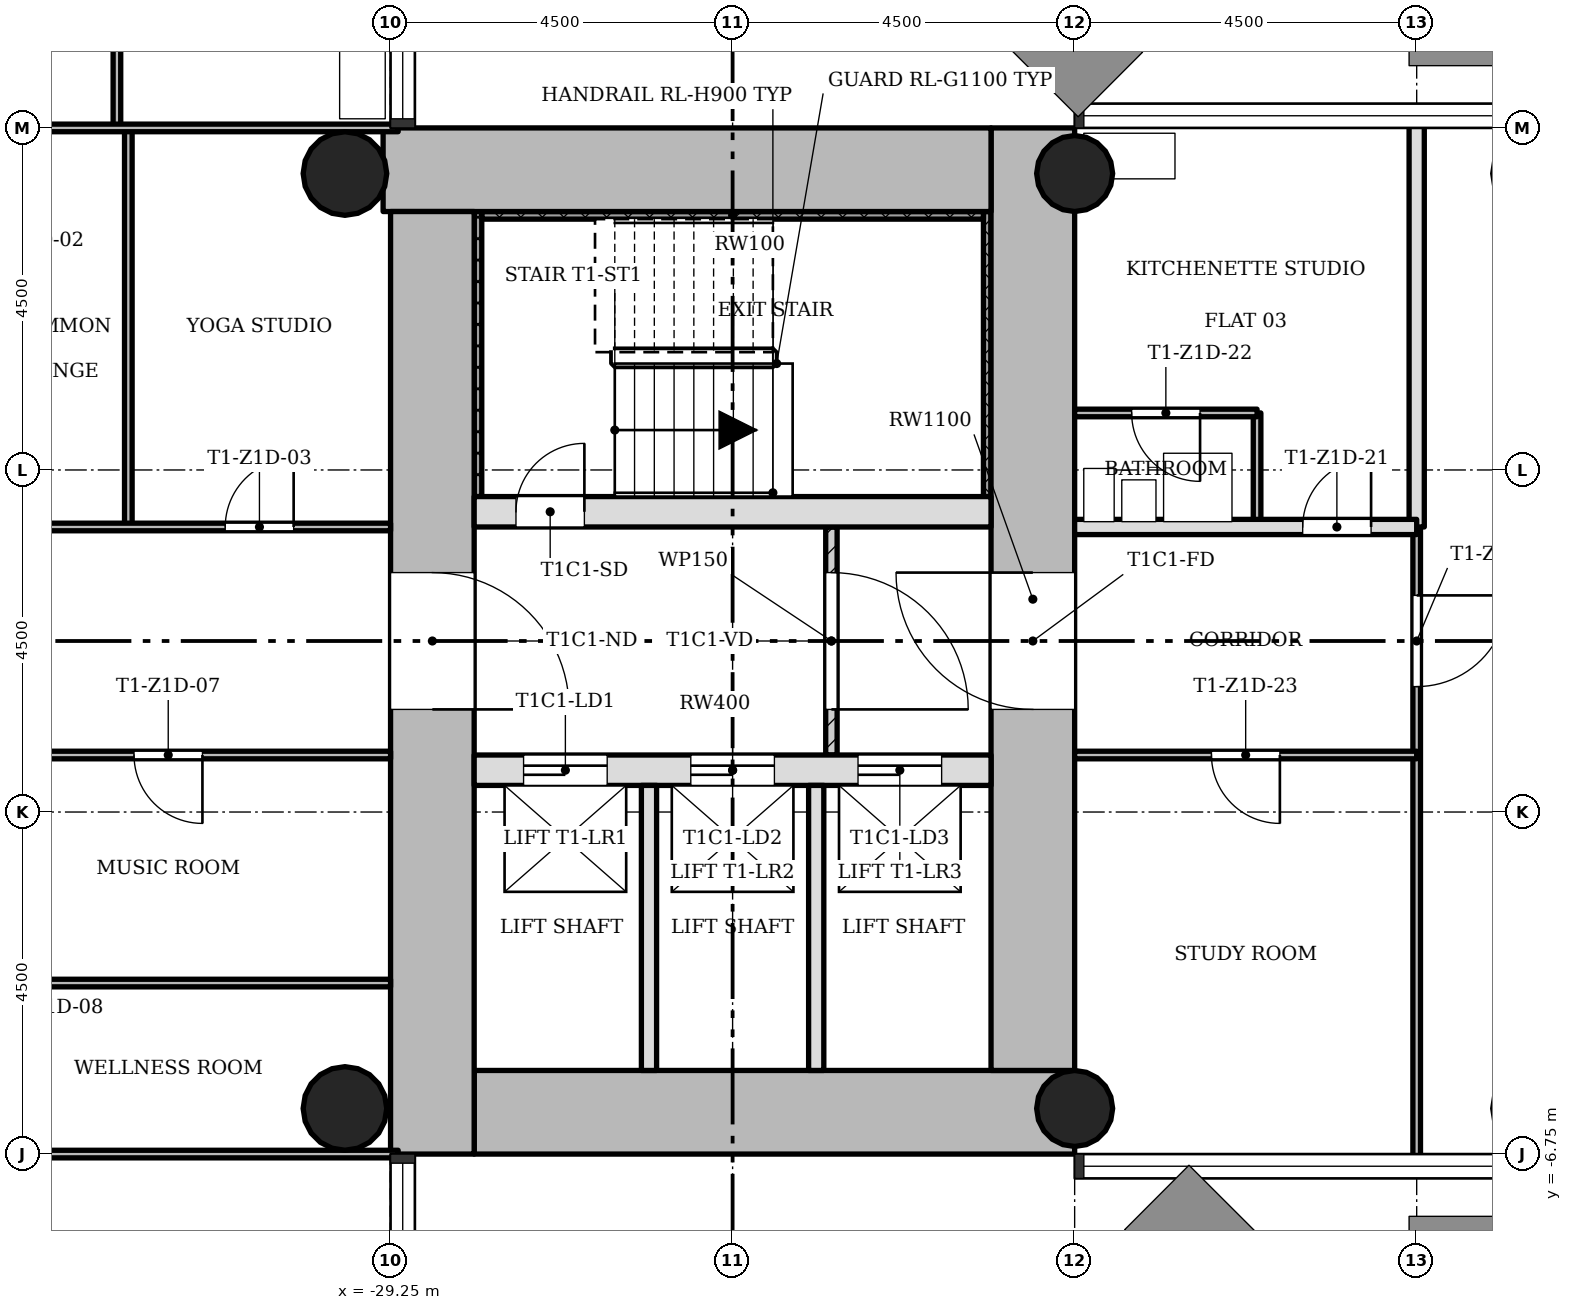
"""IFC4 building model, lengths in metres.
Left out: names, types, materials, properties, quantities, classifications, styles, units other than length and angle.
Written with IfcOpenShell. Run it as: python <this file> out.ifc"""

import sys

from ifc_helpers import new_model, si_unit, direction, frame, frame_2d, origin, origin_2d, place, context, subcontext, project, spatial, rectangle, hollow_circle, extrude, element, fill, save


model = new_model("IFC4")
c1 = context("Model", 3, precision=1e-05, world=origin(), true_north=direction((0.0, 1.0)))
c2 = subcontext(c1, "Body", "Model", "MODEL_VIEW")
j1 = project(units=[si_unit("LENGTHUNIT", "METRE"), si_unit("PLANEANGLEUNIT", "RADIAN")], contexts=[c1])
p1 = place(None, origin())
s1 = spatial("IfcSite", under=j1, at=p1, CompositionType="ELEMENT")
p2 = place(p1, origin())
s2 = spatial("IfcBuilding", under=s1, at=p2, CompositionType="ELEMENT")
p3 = place(p2, frame((0.0, 0.0, 58.5)))
s3 = spatial("IfcBuildingStorey", under=s2, at=p3, CompositionType="ELEMENT", Elevation=58.5)
p4 = place(p3, frame((-28.15, -6.2, 0.0), z_axis=(0.0, 0.0, 1.0), x_axis=(1.0, 0.0, 0.0)))
e1 = element("IfcWall", 1, at=p4, inside=s3, PredefinedType="SHEAR", context=c2, shape_type="SweptSolid", body=[
    extrude(rectangle(XDim=7.9, YDim=1.1, at=frame_2d((3.95, 0.0))), origin(), (0.0, 0.0, 1.0), 3.4),
])
p5 = place(p3, frame((-20.8, -5.65, 0.0), z_axis=(0.0, 0.0, 1.0), x_axis=(0.0, 1.0, 0.0)))
e2 = element("IfcWall", 2, at=p5, inside=s3, PredefinedType="SHEAR", context=c2, shape_type="SweptSolid", body=[
    extrude(rectangle(XDim=12.4, YDim=1.1, at=frame_2d((6.2, 0.0))), origin(), (0.0, 0.0, 1.0), 3.4),
])
p6 = place(p5, frame((4.75, 0.0, 0.0)))
e3 = element("IfcOpeningElement", 3, at=p6, cuts=e2, PredefinedType="OPENING", context=c2, shape_type="SweptSolid", body=[
    extrude(rectangle(XDim=1.8, YDim=2.1, at=frame_2d((0.9, 1.05))), frame((0.0, 0.56, 0.0), z_axis=(0.0, -1.0, 0.0), x_axis=(1.0, 0.0, 0.0)), (0.0, 0.0, 1.0), 1.12),
])
p7 = place(p3, frame((-21.35, 6.2, 0.0), z_axis=(0.0, 0.0, 1.0), x_axis=(-1.0, 0.0, 0.0)))
e4 = element("IfcWall", 4, at=p7, inside=s3, PredefinedType="SHEAR", context=c2, shape_type="SweptSolid", body=[
    extrude(rectangle(XDim=7.998, YDim=1.1, at=frame_2d((3.999, 0.0))), origin(), (0.0, 0.0, 1.0), 3.4),
])
p8 = place(p3, frame((-28.7, 5.65, 0.0), z_axis=(0.0, 0.0, 1.0), x_axis=(0.0, -1.0, 0.0)))
e5 = element("IfcWall", 5, at=p8, inside=s3, PredefinedType="SHEAR", context=c2, shape_type="SweptSolid", body=[
    extrude(rectangle(XDim=12.4, YDim=1.1, at=frame_2d((6.2, 0.0))), origin(), (0.0, 0.0, 1.0), 3.4),
])
p9 = place(p8, frame((4.75, 0.0, 0.0)))
e6 = element("IfcOpeningElement", 6, at=p9, cuts=e5, PredefinedType="OPENING", context=c2, shape_type="SweptSolid", body=[
    extrude(rectangle(XDim=1.8, YDim=2.1, at=frame_2d((0.9, 1.05))), frame((0.0, 0.56, 0.0), z_axis=(0.0, -1.0, 0.0), x_axis=(1.0, 0.0, 0.0)), (0.0, 0.0, 1.0), 1.12),
])
p10 = place(p3, frame((-28.15, -1.7, 0.0), z_axis=(0.0, 0.0, 1.0), x_axis=(1.0, 0.0, 0.0)))
e7 = element("IfcWall", 7, at=p10, inside=s3, PredefinedType="SHEAR", context=c2, shape_type="SweptSolid", body=[
    extrude(rectangle(XDim=6.8, YDim=0.4, at=frame_2d((3.4, 0.0))), origin(), (0.0, 0.0, 1.0), 3.4),
])
p11 = place(p10, frame((0.65, 0.0, 0.0)))
e8 = element("IfcOpeningElement", 8, at=p11, cuts=e7, PredefinedType="OPENING", context=c2, shape_type="SweptSolid", body=[
    extrude(rectangle(XDim=1.1, YDim=2.1, at=frame_2d((0.55, 1.05))), frame((0.0, 0.21, 0.0), z_axis=(0.0, -1.0, 0.0), x_axis=(1.0, 0.0, 0.0)), (0.0, 0.0, 1.0), 0.42),
])
p12 = place(p10, frame((2.85, 0.0, 0.0)))
e9 = element("IfcOpeningElement", 9, at=p12, cuts=e7, PredefinedType="OPENING", context=c2, shape_type="SweptSolid", body=[
    extrude(rectangle(XDim=1.1, YDim=2.1, at=frame_2d((0.55, 1.05))), frame((0.0, 0.21, 0.0), z_axis=(0.0, -1.0, 0.0), x_axis=(1.0, 0.0, 0.0)), (0.0, 0.0, 1.0), 0.42),
])
p13 = place(p10, frame((5.05, 0.0, 0.0)))
e10 = element("IfcOpeningElement", 10, at=p13, cuts=e7, PredefinedType="OPENING", context=c2, shape_type="SweptSolid", body=[
    extrude(rectangle(XDim=1.1, YDim=2.1, at=frame_2d((0.55, 1.05))), frame((0.0, 0.21, 0.0), z_axis=(0.0, -1.0, 0.0), x_axis=(1.0, 0.0, 0.0)), (0.0, 0.0, 1.0), 0.42),
])
p14 = place(p3, frame((-28.15, 1.7, 0.0), z_axis=(0.0, 0.0, 1.0), x_axis=(1.0, 0.0, 0.0)))
e11 = element("IfcWall", 11, at=p14, inside=s3, PredefinedType="SHEAR", context=c2, shape_type="SweptSolid", body=[
    extrude(rectangle(XDim=6.8, YDim=0.4, at=frame_2d((3.4, 0.0))), origin(), (0.0, 0.0, 1.0), 3.4),
])
p15 = place(p14, frame((0.55, 0.0, 0.0)))
e12 = element("IfcOpeningElement", 12, at=p15, cuts=e11, PredefinedType="OPENING", context=c2, shape_type="SweptSolid", body=[
    extrude(rectangle(XDim=0.9, YDim=2.1, at=frame_2d((0.45, 1.05))), frame((0.0, 0.21, 0.0), z_axis=(0.0, -1.0, 0.0), x_axis=(1.0, 0.0, 0.0)), (0.0, 0.0, 1.0), 0.42),
])
for number, where, z_axis, x_axis in (
    (13, (-20.25, -6.15, 0.0), (0.0, 0.0, 1.0), (1.0, 0.0, 0.0)),
    (14, (-20.25, 6.15, 0.0), (0.0, 0.0, 1.0), (1.0, 0.0, 0.0)),
):
    element("IfcColumn", number, at=place(p3, frame(where, z_axis=z_axis, x_axis=x_axis)), inside=s3, PredefinedType="COLUMN", context=c2, shape_type="SweptSolid", body=[
        extrude(hollow_circle(Radius=0.5, WallThickness=0.036, at=origin_2d()), origin(), (0.0, 0.0, 1.0), 3.4),
    ])
for number, where, z_axis, x_axis in (
    (15, (-29.85, -6.15, 0.0), (0.0, 0.0, 1.0), (1.0, 0.0, 0.0)),
    (16, (-29.85, 6.15, 0.0), (0.0, 0.0, 1.0), (1.0, 0.0, 0.0)),
):
    element("IfcColumn", number, at=place(p3, frame(where, z_axis=z_axis, x_axis=x_axis)), inside=s3, PredefinedType="COLUMN", context=c2, shape_type="SweptSolid", body=[
        extrude(hollow_circle(Radius=0.55, WallThickness=0.04, at=origin_2d()), origin(), (0.0, 0.0, 1.0), 3.4),
    ])
p16 = place(p3, frame((-23.45, -1.5, 0.0), z_axis=(0.0, 0.0, 1.0), x_axis=(0.0, 1.0, 0.0)))
e17 = element("IfcWall", 17, at=p16, inside=s3, PredefinedType="PARTITIONING", context=c2, shape_type="SweptSolid", body=[
    extrude(rectangle(XDim=3.0, YDim=0.15, at=frame_2d((1.5, 0.0))), origin(), (0.0, 0.0, 1.0), 3.0),
])
p17 = place(p16, frame((0.6, 0.0, 0.0)))
e18 = element("IfcOpeningElement", 18, at=p17, cuts=e17, PredefinedType="OPENING", context=c2, shape_type="SweptSolid", body=[
    extrude(rectangle(XDim=1.8, YDim=2.1, at=frame_2d((0.9, 1.05))), frame((0.0, 0.085, 0.0), z_axis=(0.0, -1.0, 0.0), x_axis=(1.0, 0.0, 0.0)), (0.0, 0.0, 1.0), 0.17),
])
for number, where, z_axis, x_axis in (
    (19, (-25.85, -5.65, 0.0), (0.0, 0.0, 1.0), (0.0, 1.0, 0.0)),
    (20, (-23.65, -5.65, 0.0), (0.0, 0.0, 1.0), (0.0, 1.0, 0.0)),
):
    element("IfcWall", number, at=place(p3, frame(where, z_axis=z_axis, x_axis=x_axis)), inside=s3, PredefinedType="SOLIDWALL", context=c2, shape_type="SweptSolid", body=[
        extrude(rectangle(XDim=3.75, YDim=0.2, at=frame_2d((1.875, 0.0))), origin(), (0.0, 0.0, 1.0), 3.0),
    ])
p18 = place(p3, frame((-32.85, 6.75, 0.0), z_axis=(0.0, 0.0, 1.0), x_axis=(0.0, 1.0, 0.0)))
e21 = element("IfcWall", 21, at=p18, inside=s3, PredefinedType="PARTITIONING", context=c2, shape_type="SweptSolid", body=[
    extrude(rectangle(XDim=9.0, YDim=0.1, at=frame_2d((4.5, 0.0))), origin(), (0.0, 0.0, 1.0), 3.0),
])
p19 = place(p18, frame((1.8, 0.0, 0.0)))
e22 = element("IfcOpeningElement", 22, at=p19, cuts=e21, PredefinedType="OPENING", context=c2, shape_type="SweptSolid", body=[
    extrude(rectangle(XDim=0.9, YDim=2.1, at=frame_2d((0.45, 1.05))), frame((0.0, 0.06, 0.0), z_axis=(0.0, -1.0, 0.0), x_axis=(1.0, 0.0, 0.0)), (0.0, 0.0, 1.0), 0.12),
])
p20 = place(p18, frame((6.3, 0.0, 0.0)))
e23 = element("IfcOpeningElement", 23, at=p20, cuts=e21, PredefinedType="OPENING", context=c2, shape_type="SweptSolid", body=[
    extrude(rectangle(XDim=0.9, YDim=2.1, at=frame_2d((0.45, 1.05))), frame((0.0, 0.06, 0.0), z_axis=(0.0, -1.0, 0.0), x_axis=(1.0, 0.0, 0.0)), (0.0, 0.0, 1.0), 0.12),
])
p21 = place(p3, frame((-32.7, 1.5, 0.0), z_axis=(0.0, 0.0, 1.0), x_axis=(0.0, 1.0, 0.0)))
e24 = element("IfcWall", 24, at=p21, inside=s3, PredefinedType="PARTITIONING", context=c2, shape_type="SweptSolid", body=[
    extrude(rectangle(XDim=5.25, YDim=0.1, at=frame_2d((2.625, 0.0))), origin(), (0.0, 0.0, 1.0), 3.0),
])
p22 = place(p3, frame((-17.85, 1.5, 0.0), z_axis=(0.0, 0.0, 1.0), x_axis=(0.0, 1.0, 0.0)))
e25 = element("IfcWall", 25, at=p22, inside=s3, PredefinedType="PARTITIONING", context=c2, shape_type="SweptSolid", body=[
    extrude(rectangle(XDim=1.5, YDim=0.1, at=frame_2d((0.75, 0.0))), origin(), (0.0, 0.0, 1.0), 3.0),
])
p23 = place(p3, frame((-15.75, -6.85, 0.0), z_axis=(0.0, 0.0, 1.0), x_axis=(0.0, 1.0, 0.0)))
e26 = element("IfcWall", 26, at=p23, inside=s3, PredefinedType="PARTITIONING", context=c2, shape_type="SweptSolid", body=[
    extrude(rectangle(XDim=8.35, YDim=0.1, at=frame_2d((4.175, 0.0))), origin(), (0.0, 0.0, 1.0), 3.0),
])
p24 = place(p23, frame((6.25, 0.0, 0.0)))
e27 = element("IfcOpeningElement", 27, at=p24, cuts=e26, PredefinedType="OPENING", context=c2, shape_type="SweptSolid", body=[
    extrude(rectangle(XDim=1.2, YDim=2.1, at=frame_2d((0.6, 1.05))), frame((0.0, 0.06, 0.0), z_axis=(0.0, -1.0, 0.0), x_axis=(1.0, 0.0, 0.0)), (0.0, 0.0, 1.0), 0.12),
])
p25 = place(p3, frame((-15.75, 1.5, 0.0), z_axis=(0.0, 0.0, 1.0), x_axis=(0.0, 1.0, 0.0)))
e28 = element("IfcWall", 28, at=p25, inside=s3, PredefinedType="SOLIDWALL", context=c2, shape_type="SweptSolid", body=[
    extrude(rectangle(XDim=5.35, YDim=0.2, at=frame_2d((2.675, 0.0))), origin(), (0.0, 0.0, 1.0), 3.0),
])
p26 = place(p3, frame((-35.1, -6.75, 0.0), z_axis=(0.0, 0.0, 1.0), x_axis=(1.0, 0.0, 0.0)))
e29 = element("IfcWall", 29, at=p26, inside=s3, PredefinedType="PARTITIONING", context=c2, shape_type="SweptSolid", body=[
    extrude(rectangle(XDim=5.95, YDim=0.1, at=frame_2d((2.975, 0.0))), origin(), (0.0, 0.0, 1.0), 3.0),
])
p27 = place(p3, frame((-35.1, -4.5, 0.0), z_axis=(0.0, 0.0, 1.0), x_axis=(1.0, 0.0, 0.0)))
e30 = element("IfcWall", 30, at=p27, inside=s3, PredefinedType="PARTITIONING", context=c2, shape_type="SweptSolid", body=[
    extrude(rectangle(XDim=5.85, YDim=0.1, at=frame_2d((2.925, 0.0))), origin(), (0.0, 0.0, 1.0), 3.0),
])
p28 = place(p3, frame((-35.1, -1.5, 0.0), z_axis=(0.0, 0.0, 1.0), x_axis=(1.0, 0.0, 0.0)))
e31 = element("IfcWall", 31, at=p28, inside=s3, PredefinedType="PARTITIONING", context=c2, shape_type="SweptSolid", body=[
    extrude(rectangle(XDim=5.85, YDim=0.1, at=frame_2d((2.925, 0.0))), origin(), (0.0, 0.0, 1.0), 3.0),
])
p29 = place(p28, frame((2.475, 0.0, 0.0)))
e32 = element("IfcOpeningElement", 32, at=p29, cuts=e31, PredefinedType="OPENING", context=c2, shape_type="SweptSolid", body=[
    extrude(rectangle(XDim=0.9, YDim=2.1, at=frame_2d((0.45, 1.05))), frame((0.0, 0.06, 0.0), z_axis=(0.0, -1.0, 0.0), x_axis=(1.0, 0.0, 0.0)), (0.0, 0.0, 1.0), 0.12),
])
p30 = place(p3, frame((-20.25, -1.5, 0.0), z_axis=(0.0, 0.0, 1.0), x_axis=(1.0, 0.0, 0.0)))
e33 = element("IfcWall", 33, at=p30, inside=s3, PredefinedType="PARTITIONING", context=c2, shape_type="SweptSolid", body=[
    extrude(rectangle(XDim=4.5, YDim=0.1, at=frame_2d((2.25, 0.0))), origin(), (0.0, 0.0, 1.0), 3.0),
])
p31 = place(p30, frame((1.8, 0.0, 0.0)))
e34 = element("IfcOpeningElement", 34, at=p31, cuts=e33, PredefinedType="OPENING", context=c2, shape_type="SweptSolid", body=[
    extrude(rectangle(XDim=0.9, YDim=2.1, at=frame_2d((0.45, 1.05))), frame((0.0, 0.06, 0.0), z_axis=(0.0, -1.0, 0.0), x_axis=(1.0, 0.0, 0.0)), (0.0, 0.0, 1.0), 0.12),
])
p32 = place(p3, frame((-35.1, 1.5, 0.0), z_axis=(0.0, 0.0, 1.0), x_axis=(1.0, 0.0, 0.0)))
e35 = element("IfcWall", 35, at=p32, inside=s3, PredefinedType="PARTITIONING", context=c2, shape_type="SweptSolid", body=[
    extrude(rectangle(XDim=5.85, YDim=0.1, at=frame_2d((2.925, 0.0))), origin(), (0.0, 0.0, 1.0), 3.0),
])
p33 = place(p32, frame((3.675, 0.0, 0.0)))
e36 = element("IfcOpeningElement", 36, at=p33, cuts=e35, PredefinedType="OPENING", context=c2, shape_type="SweptSolid", body=[
    extrude(rectangle(XDim=0.9, YDim=2.1, at=frame_2d((0.45, 1.05))), frame((0.0, 0.06, 0.0), z_axis=(0.0, -1.0, 0.0), x_axis=(1.0, 0.0, 0.0)), (0.0, 0.0, 1.0), 0.12),
])
p34 = place(p3, frame((-20.25, 1.5, 0.0), z_axis=(0.0, 0.0, 1.0), x_axis=(1.0, 0.0, 0.0)))
e37 = element("IfcWall", 37, at=p34, inside=s3, PredefinedType="SOLIDWALL", context=c2, shape_type="SweptSolid", body=[
    extrude(rectangle(XDim=4.5, YDim=0.2, at=frame_2d((2.25, 0.0))), origin(), (0.0, 0.0, 1.0), 3.0),
])
p35 = place(p34, frame((3.0, 0.0, 0.0)))
e38 = element("IfcOpeningElement", 38, at=p35, cuts=e37, PredefinedType="OPENING", context=c2, shape_type="SweptSolid", body=[
    extrude(rectangle(XDim=0.9, YDim=2.1, at=frame_2d((0.45, 1.05))), frame((0.0, 0.11, 0.0), z_axis=(0.0, -1.0, 0.0), x_axis=(1.0, 0.0, 0.0)), (0.0, 0.0, 1.0), 0.22),
])
p36 = place(p3, frame((-20.25, 3.0, 0.0), z_axis=(0.0, 0.0, 1.0), x_axis=(1.0, 0.0, 0.0)))
e39 = element("IfcWall", 39, at=p36, inside=s3, PredefinedType="PARTITIONING", context=c2, shape_type="SweptSolid", body=[
    extrude(rectangle(XDim=2.4, YDim=0.1, at=frame_2d((1.2, 0.0))), origin(), (0.0, 0.0, 1.0), 3.0),
])
p37 = place(p36, frame((0.75, 0.0, 0.0)))
e40 = element("IfcOpeningElement", 40, at=p37, cuts=e39, PredefinedType="OPENING", context=c2, shape_type="SweptSolid", body=[
    extrude(rectangle(XDim=0.9, YDim=2.1, at=frame_2d((0.45, 1.05))), frame((0.0, 0.06, 0.0), z_axis=(0.0, -1.0, 0.0), x_axis=(1.0, 0.0, 0.0)), (0.0, 0.0, 1.0), 0.12),
])
p38 = place(p3, frame((-35.1, 6.75, 0.0), z_axis=(0.0, 0.0, 1.0), x_axis=(1.0, 0.0, 0.0)))
e41 = element("IfcWall", 41, at=p38, inside=s3, PredefinedType="PARTITIONING", context=c2, shape_type="SweptSolid", body=[
    extrude(rectangle(XDim=5.95, YDim=0.1, at=frame_2d((2.975, 0.0))), origin(), (0.0, 0.0, 1.0), 3.0),
])
p39 = place(p3, frame((-21.4, 1.9, 0.0), z_axis=(0.0, 0.0, 1.0), x_axis=(0.0, 1.0, 0.0)))
e42 = element("IfcWall", 42, at=p39, inside=s3, PredefinedType="SHEAR", context=c2, shape_type="SweptSolid", body=[
    extrude(rectangle(XDim=3.75, YDim=0.1, at=frame_2d((1.875, 0.0))), origin(), (0.0, 0.0, 1.0), 3.4),
])
p40 = place(p3, frame((-28.05, 5.6, 0.0), z_axis=(0.0, 0.0, 1.0), x_axis=(1.0, 0.0, 0.0)))
e43 = element("IfcWall", 43, at=p40, inside=s3, PredefinedType="SHEAR", context=c2, shape_type="SweptSolid", body=[
    extrude(rectangle(XDim=6.6, YDim=0.1, at=frame_2d((3.3, 0.0))), origin(), (0.0, 0.0, 1.0), 3.4),
])
p41 = place(p3, frame((-28.1, 1.9, 0.0), z_axis=(0.0, 0.0, 1.0), x_axis=(0.0, 1.0, 0.0)))
e44 = element("IfcWall", 44, at=p41, inside=s3, PredefinedType="SHEAR", context=c2, shape_type="SweptSolid", body=[
    extrude(rectangle(XDim=3.75, YDim=0.1, at=frame_2d((1.875, 0.0))), origin(), (0.0, 0.0, 1.0), 3.4),
])
p42 = place(p17, origin())
e45 = element("IfcDoor", 45, at=p42, inside=s3, OperationType="SINGLE_SWING_LEFT", PredefinedType="DOOR", context=c2, shape_type="SweptSolid", body=[
    extrude(rectangle(XDim=1.8, YDim=2.1, at=frame_2d((0.9, 1.05))), frame((0.0, 0.025, 0.0), z_axis=(0.0, -1.0, 0.0), x_axis=(1.0, 0.0, 0.0)), (0.0, 0.0, 1.0), 0.05),
])
fill(e18, e45)
p43 = place(p33, origin())
e46 = element("IfcDoor", 46, at=p43, inside=s3, OperationType="SINGLE_SWING_LEFT", PredefinedType="DOOR", context=c2, shape_type="SweptSolid", body=[
    extrude(rectangle(XDim=0.9, YDim=2.1, at=frame_2d((0.45, 1.05))), frame((0.0, 0.025, 0.0), z_axis=(0.0, -1.0, 0.0), x_axis=(1.0, 0.0, 0.0)), (0.0, 0.0, 1.0), 0.05),
])
fill(e36, e46)
p44 = place(p29, origin())
e47 = element("IfcDoor", 47, at=p44, inside=s3, OperationType="SINGLE_SWING_RIGHT", PredefinedType="DOOR", context=c2, shape_type="SweptSolid", body=[
    extrude(rectangle(XDim=0.9, YDim=2.1, at=frame_2d((0.45, 1.05))), frame((0.0, 0.025, 0.0), z_axis=(0.0, -1.0, 0.0), x_axis=(1.0, 0.0, 0.0)), (0.0, 0.0, 1.0), 0.05),
])
fill(e32, e47)
p45 = place(p35, origin())
e48 = element("IfcDoor", 48, at=p45, inside=s3, OperationType="SINGLE_SWING_LEFT", PredefinedType="DOOR", context=c2, shape_type="SweptSolid", body=[
    extrude(rectangle(XDim=0.9, YDim=2.1, at=frame_2d((0.45, 1.05))), frame((0.0, 0.025, 0.0), z_axis=(0.0, -1.0, 0.0), x_axis=(1.0, 0.0, 0.0)), (0.0, 0.0, 1.0), 0.05),
])
fill(e38, e48)
p46 = place(p37, origin())
e49 = element("IfcDoor", 49, at=p46, inside=s3, OperationType="SINGLE_SWING_RIGHT", PredefinedType="DOOR", context=c2, shape_type="SweptSolid", body=[
    extrude(rectangle(XDim=0.9, YDim=2.1, at=frame_2d((0.45, 1.05))), frame((0.0, 0.025, 0.0), z_axis=(0.0, -1.0, 0.0), x_axis=(1.0, 0.0, 0.0)), (0.0, 0.0, 1.0), 0.05),
])
fill(e40, e49)
p47 = place(p31, origin())
e50 = element("IfcDoor", 50, at=p47, inside=s3, OperationType="SINGLE_SWING_RIGHT", PredefinedType="DOOR", context=c2, shape_type="SweptSolid", body=[
    extrude(rectangle(XDim=0.9, YDim=2.1, at=frame_2d((0.45, 1.05))), frame((0.0, 0.025, 0.0), z_axis=(0.0, -1.0, 0.0), x_axis=(1.0, 0.0, 0.0)), (0.0, 0.0, 1.0), 0.05),
])
fill(e34, e50)
p48 = place(p24, origin())
e51 = element("IfcDoor", 51, at=p48, inside=s3, OperationType="SINGLE_SWING_RIGHT", PredefinedType="DOOR", context=c2, shape_type="SweptSolid", body=[
    extrude(rectangle(XDim=1.2, YDim=2.1, at=frame_2d((0.6, 1.05))), frame((0.0, 0.025, 0.0), z_axis=(0.0, -1.0, 0.0), x_axis=(1.0, 0.0, 0.0)), (0.0, 0.0, 1.0), 0.05),
])
fill(e27, e51)
p49 = place(p15, origin())
e52 = element("IfcDoor", 52, at=p49, inside=s3, OperationType="SINGLE_SWING_LEFT", PredefinedType="DOOR", context=c2, shape_type="SweptSolid", body=[
    extrude(rectangle(XDim=0.9, YDim=2.1, at=frame_2d((0.45, 1.05))), frame((0.0, 0.025, 0.0), z_axis=(0.0, -1.0, 0.0), x_axis=(1.0, 0.0, 0.0)), (0.0, 0.0, 1.0), 0.05),
])
fill(e12, e52)
p50 = place(p11, origin())
e53 = element("IfcDoor", 53, at=p50, inside=s3, OperationType="SLIDING_TO_LEFT", PredefinedType="DOOR", context=c2, shape_type="SweptSolid", body=[
    extrude(rectangle(XDim=1.1, YDim=2.1, at=frame_2d((0.55, 1.05))), frame((0.0, 0.025, 0.0), z_axis=(0.0, -1.0, 0.0), x_axis=(1.0, 0.0, 0.0)), (0.0, 0.0, 1.0), 0.05),
])
fill(e8, e53)
p51 = place(p12, origin())
e54 = element("IfcDoor", 54, at=p51, inside=s3, OperationType="SLIDING_TO_LEFT", PredefinedType="DOOR", context=c2, shape_type="SweptSolid", body=[
    extrude(rectangle(XDim=1.1, YDim=2.1, at=frame_2d((0.55, 1.05))), frame((0.0, 0.025, 0.0), z_axis=(0.0, -1.0, 0.0), x_axis=(1.0, 0.0, 0.0)), (0.0, 0.0, 1.0), 0.05),
])
fill(e9, e54)
p52 = place(p13, origin())
e55 = element("IfcDoor", 55, at=p52, inside=s3, OperationType="SLIDING_TO_LEFT", PredefinedType="DOOR", context=c2, shape_type="SweptSolid", body=[
    extrude(rectangle(XDim=1.1, YDim=2.1, at=frame_2d((0.55, 1.05))), frame((0.0, 0.025, 0.0), z_axis=(0.0, -1.0, 0.0), x_axis=(1.0, 0.0, 0.0)), (0.0, 0.0, 1.0), 0.05),
])
fill(e10, e55)
p53 = place(p9, origin())
e56 = element("IfcDoor", 56, at=p53, inside=s3, OperationType="SINGLE_SWING_LEFT", PredefinedType="DOOR", context=c2, shape_type="SweptSolid", body=[
    extrude(rectangle(XDim=1.8, YDim=2.1, at=frame_2d((0.9, 1.05))), frame((0.0, 0.025, 0.0), z_axis=(0.0, -1.0, 0.0), x_axis=(1.0, 0.0, 0.0)), (0.0, 0.0, 1.0), 0.05),
])
fill(e6, e56)
p54 = place(p6, origin())
e57 = element("IfcDoor", 57, at=p54, inside=s3, OperationType="SINGLE_SWING_LEFT", PredefinedType="DOOR", context=c2, shape_type="SweptSolid", body=[
    extrude(rectangle(XDim=1.8, YDim=2.1, at=frame_2d((0.9, 1.05))), frame((0.0, 0.025, 0.0), z_axis=(0.0, -1.0, 0.0), x_axis=(1.0, 0.0, 0.0)), (0.0, 0.0, 1.0), 0.05),
])
fill(e3, e57)
save(model, sys.argv[1])
